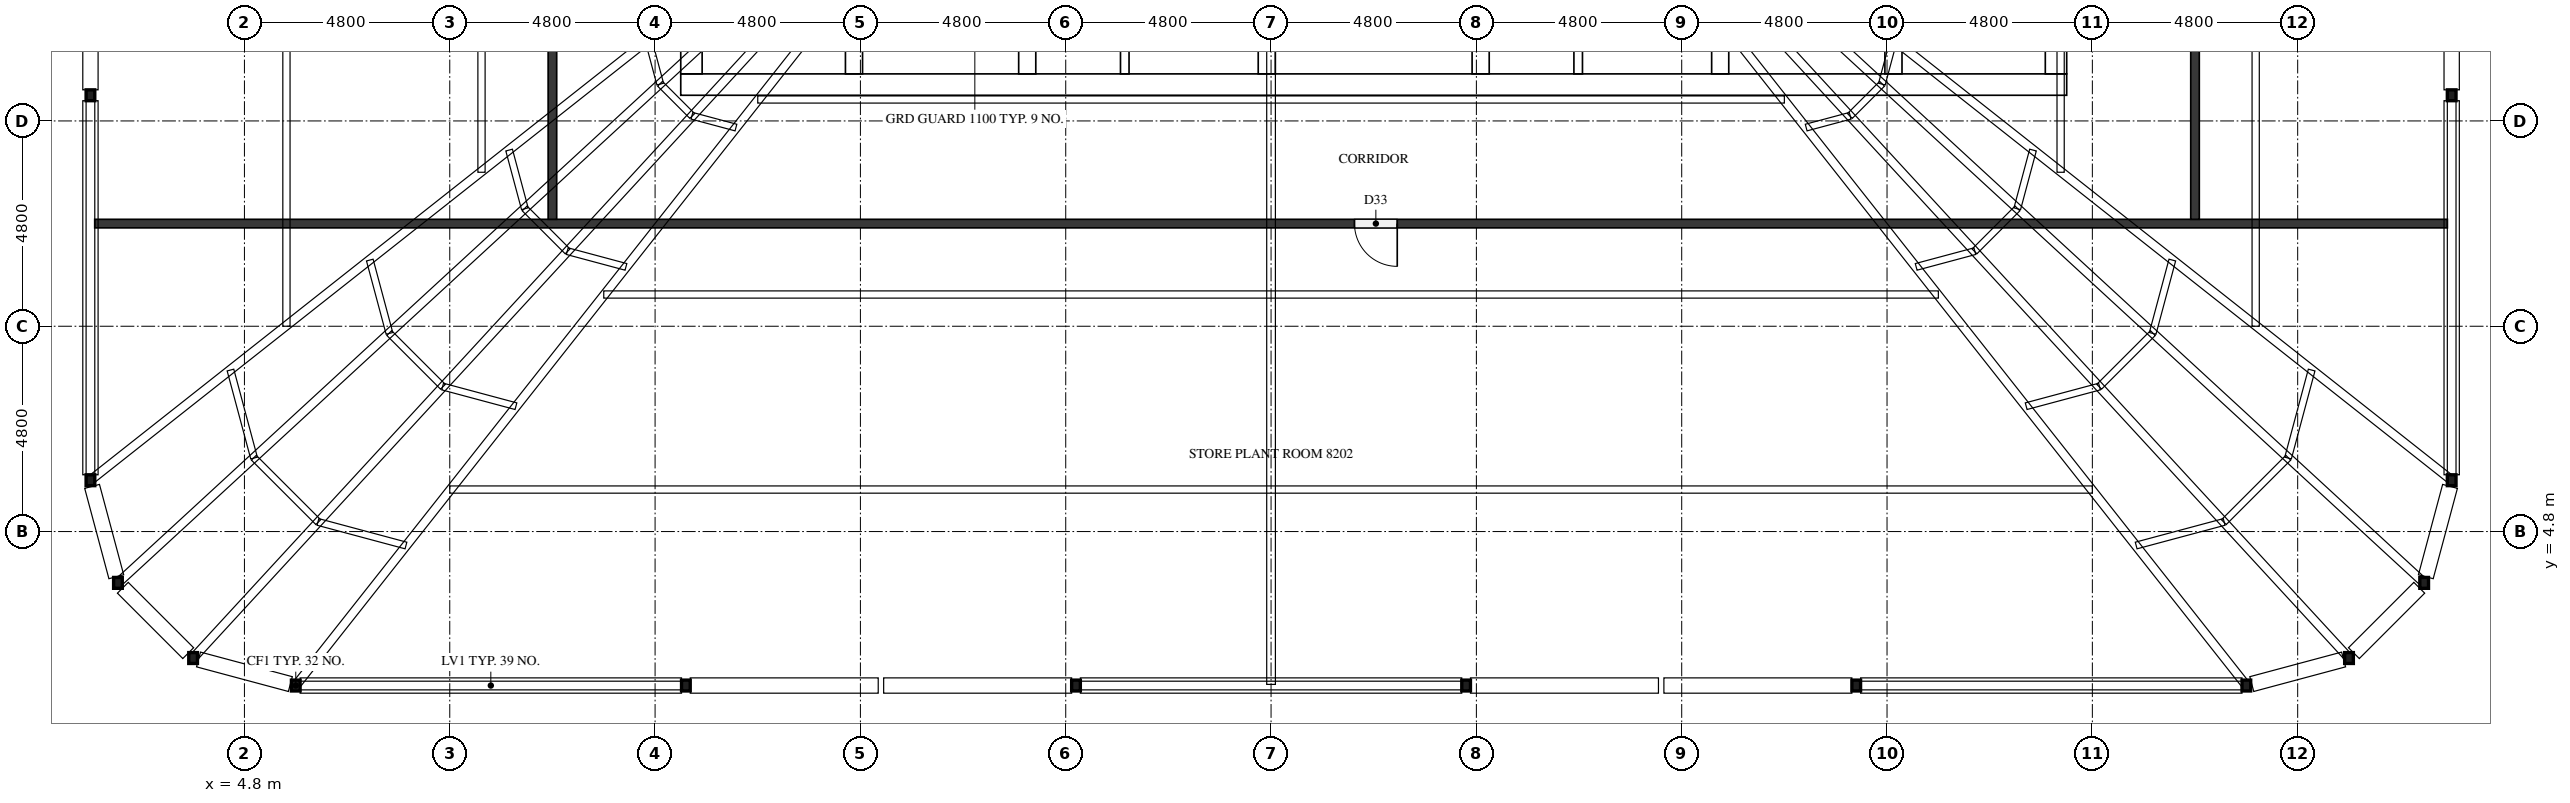
"""IFC4 building model, lengths in metres.
Left out: names, types, materials, properties, quantities, classifications, styles, units other than length and angle.
Written with IfcOpenShell. Run it as: python <this file> out.ifc"""

import sys

from ifc_helpers import new_model, si_unit, direction, frame, frame_2d, origin, origin_2d, place, context, subcontext, project, spatial, rectangle, hollow_rectangle, extrude, element, fill, save


model = new_model("IFC4")
c1 = context("Model", 3, precision=1e-05, world=origin(), true_north=direction((0.0, 1.0)))
c2 = subcontext(c1, "Body", "Model", "MODEL_VIEW")
j1 = project(units=[si_unit("LENGTHUNIT", "METRE"), si_unit("PLANEANGLEUNIT", "RADIAN")], contexts=[c1])
p1 = place(None, origin())
s1 = spatial("IfcSite", under=j1, at=p1, CompositionType="ELEMENT")
p2 = place(p1, origin())
s2 = spatial("IfcBuilding", under=s1, at=p2, CompositionType="ELEMENT")
p3 = place(p2, frame((0.0, 0.0, 317.3)))
s3 = spatial("IfcBuildingStorey", under=s2, at=p3, CompositionType="ELEMENT", Elevation=317.3)
p4 = place(p3, frame((15.0, 15.25, 0.0), z_axis=(0.0, 0.0, 1.0), x_axis=(1.0, 0.0, 0.0)))
e1 = element("IfcWall", 1, at=p4, inside=s3, PredefinedType="SHEAR", context=c2, shape_type="SweptSolid", body=[
    extrude(rectangle(XDim=32.4, YDim=0.5, at=frame_2d((16.2, 0.0))), origin(), (0.0, 0.0, 1.0), 3.0),
])
p5 = place(p4, frame((15.3, 0.0, 0.0)))
e2 = element("IfcOpeningElement", 2, at=p5, cuts=e1, PredefinedType="OPENING", context=c2, shape_type="SweptSolid", body=[
    extrude(rectangle(XDim=1.8, YDim=2.1, at=frame_2d((0.9, 1.05))), frame((0.0, 0.26, 0.0), z_axis=(0.0, -1.0, 0.0), x_axis=(1.0, 0.0, 0.0)), (0.0, 0.0, 1.0), 0.52),
])
p6 = place(p3, frame((15.25, 15.5, 0.0), z_axis=(0.0, 0.0, 1.0), x_axis=(0.0, 1.0, 0.0)))
e3 = element("IfcWall", 3, at=p6, inside=s3, PredefinedType="SHEAR", context=c2, shape_type="SweptSolid", body=[
    extrude(rectangle(XDim=21.8, YDim=0.5, at=frame_2d((10.9, 0.0))), origin(), (0.0, 0.0, 1.0), 3.0),
])
p7 = place(p6, frame((5.26, 0.0, 0.0)))
e4 = element("IfcOpeningElement", 4, at=p7, cuts=e3, PredefinedType="OPENING", context=c2, shape_type="SweptSolid", body=[
    extrude(rectangle(XDim=1.2, YDim=2.1, at=frame_2d((0.6, 1.05))), frame((0.0, 0.26, 0.0), z_axis=(0.0, -1.0, 0.0), x_axis=(1.0, 0.0, 0.0)), (0.0, 0.0, 1.0), 0.52),
])
p8 = place(p3, frame((47.15, 15.5, 0.0), z_axis=(0.0, 0.0, 1.0), x_axis=(0.0, 1.0, 0.0)))
e5 = element("IfcWall", 5, at=p8, inside=s3, PredefinedType="SHEAR", context=c2, shape_type="SweptSolid", body=[
    extrude(rectangle(XDim=21.8, YDim=0.5, at=frame_2d((10.9, 0.0))), origin(), (0.0, 0.0, 1.0), 3.0),
])
p9 = place(p8, frame((10.6, 0.0, 0.0)))
e6 = element("IfcOpeningElement", 6, at=p9, cuts=e5, PredefinedType="OPENING", context=c2, shape_type="SweptSolid", body=[
    extrude(rectangle(XDim=1.2, YDim=2.1, at=frame_2d((0.6, 1.05))), frame((0.0, 0.26, 0.0), z_axis=(0.0, -1.0, 0.0), x_axis=(1.0, 0.0, 0.0)), (0.0, 0.0, 1.0), 0.52),
])
p10 = place(p3, frame((19.05, 15.5, 0.0), z_axis=(0.0, 0.0, 1.0), x_axis=(0.0, 1.0, 0.0)))
e7 = element("IfcWall", 7, at=p10, inside=s3, PredefinedType="SHEAR", context=c2, shape_type="SweptSolid", body=[
    extrude(rectangle(XDim=15.55, YDim=0.4, at=frame_2d((7.775, 0.0))), origin(), (0.0, 0.0, 1.0), 3.0),
])
p11 = place(p10, frame((9.95, 0.0, 0.0)))
e8 = element("IfcOpeningElement", 8, at=p11, cuts=e7, PredefinedType="OPENING", context=c2, shape_type="SweptSolid", body=[
    extrude(rectangle(XDim=1.1, YDim=2.1, at=frame_2d((0.55, 1.05))), frame((0.0, 0.21, 0.0), z_axis=(0.0, -1.0, 0.0), x_axis=(1.0, 0.0, 0.0)), (0.0, 0.0, 1.0), 0.42),
])
p12 = place(p10, frame((13.45, 0.0, 0.0)))
e9 = element("IfcOpeningElement", 9, at=p12, cuts=e7, PredefinedType="OPENING", context=c2, shape_type="SweptSolid", body=[
    extrude(rectangle(XDim=1.1, YDim=2.1, at=frame_2d((0.55, 1.05))), frame((0.0, 0.21, 0.0), z_axis=(0.0, -1.0, 0.0), x_axis=(1.0, 0.0, 0.0)), (0.0, 0.0, 1.0), 0.42),
])
p13 = place(p10, frame((0.7, 0.0, 0.0)))
e10 = element("IfcOpeningElement", 10, at=p13, cuts=e7, PredefinedType="OPENING", context=c2, shape_type="SweptSolid", body=[
    extrude(rectangle(XDim=1.2, YDim=2.1, at=frame_2d((0.6, 1.05))), frame((0.0, 0.21, 0.0), z_axis=(0.0, -1.0, 0.0), x_axis=(1.0, 0.0, 0.0)), (0.0, 0.0, 1.0), 0.42),
])
p14 = place(p3, frame((23.1, 15.5, 0.0), z_axis=(0.0, 0.0, 1.0), x_axis=(0.0, 1.0, 0.0)))
e11 = element("IfcWall", 11, at=p14, inside=s3, PredefinedType="SHEAR", context=c2, shape_type="SweptSolid", body=[
    extrude(rectangle(XDim=21.8, YDim=0.4, at=frame_2d((10.9, 0.0))), origin(), (0.0, 0.0, 1.0), 3.0),
])
p15 = place(p3, frame((39.3, 15.5, 0.0), z_axis=(0.0, 0.0, 1.0), x_axis=(0.0, 1.0, 0.0)))
e12 = element("IfcWall", 12, at=p15, inside=s3, PredefinedType="SHEAR", context=c2, shape_type="SweptSolid", body=[
    extrude(rectangle(XDim=8.75, YDim=0.4, at=frame_2d((4.375, 0.0))), origin(), (0.0, 0.0, 1.0), 3.0),
])
p16 = place(p3, frame((43.35, 15.5, 0.0), z_axis=(0.0, 0.0, 1.0), x_axis=(0.0, 1.0, 0.0)))
e13 = element("IfcWall", 13, at=p16, inside=s3, PredefinedType="SHEAR", context=c2, shape_type="SweptSolid", body=[
    extrude(rectangle(XDim=8.75, YDim=0.4, at=frame_2d((4.375, 0.0))), origin(), (0.0, 0.0, 1.0), 3.0),
])
p17 = place(p16, frame((0.7, 0.0, 0.0)))
e14 = element("IfcOpeningElement", 14, at=p17, cuts=e13, PredefinedType="OPENING", context=c2, shape_type="SweptSolid", body=[
    extrude(rectangle(XDim=1.2, YDim=2.1, at=frame_2d((0.6, 1.05))), frame((0.0, 0.21, 0.0), z_axis=(0.0, -1.0, 0.0), x_axis=(1.0, 0.0, 0.0)), (0.0, 0.0, 1.0), 0.42),
])
for number, where, z_axis, x_axis in (
    (15, (28.7, 15.5, 0.0), (0.0, 0.0, 1.0), (0.0, 1.0, 0.0)),
    (16, (33.7, 15.5, 0.0), (0.0, 0.0, 1.0), (0.0, 1.0, 0.0)),
):
    element("IfcWall", number, at=place(p3, frame(where, z_axis=z_axis, x_axis=x_axis)), inside=s3, PredefinedType="SHEAR", context=c2, shape_type="SweptSolid", body=[
        extrude(rectangle(XDim=3.05, YDim=0.4, at=frame_2d((1.525, 0.0))), origin(), (0.0, 0.0, 1.0), 3.0),
    ])
for number, where, z_axis, x_axis in (
    (17, (6.0, 1.2, 0.0), (0.0, 0.0, 1.0), (1.0, 0.0, 0.0)),
    (18, (15.12, 1.2, 0.0), (0.0, 0.0, 1.0), (1.0, 0.0, 0.0)),
    (19, (24.24, 1.2, 0.0), (0.0, 0.0, 1.0), (1.0, 0.0, 0.0)),
    (20, (33.36, 1.2, 0.0), (0.0, 0.0, 1.0), (1.0, 0.0, 0.0)),
    (21, (42.48, 1.2, 0.0), (0.0, 0.0, 1.0), (1.0, 0.0, 0.0)),
    (22, (51.6, 1.2, 0.0), (0.0, 0.0, 1.0), (1.0, 0.0, 0.0)),
    (23, (54.0, 1.843, 0.0), (0.0, 0.0, 1.0), (1.0, 0.0, 0.0)),
    (24, (55.757, 3.6, 0.0), (0.0, 0.0, 1.0), (1.0, 0.0, 0.0)),
    (25, (56.4, 6.0, 0.0), (0.0, 0.0, 1.0), (1.0, 0.0, 0.0)),
    (26, (56.4, 15.0, 0.0), (0.0, 0.0, 1.0), (1.0, 0.0, 0.0)),
    (27, (1.2, 15.0, 0.0), (0.0, 0.0, 1.0), (1.0, 0.0, 0.0)),
    (28, (1.2, 6.0, 0.0), (0.0, 0.0, 1.0), (1.0, 0.0, 0.0)),
    (29, (1.843, 3.6, 0.0), (0.0, 0.0, 1.0), (1.0, 0.0, 0.0)),
    (30, (3.6, 1.843, 0.0), (0.0, 0.0, 1.0), (1.0, 0.0, 0.0)),
):
    element("IfcColumn", number, at=place(p3, frame(where, z_axis=z_axis, x_axis=x_axis)), inside=s3, PredefinedType="COLUMN", context=c2, shape_type="SweptSolid", body=[
        extrude(hollow_rectangle(XDim=0.203, YDim=0.254, WallThickness=0.01, InnerFilletRadius=0.004, OuterFilletRadius=0.013, at=origin_2d()), origin(), (0.0, 0.0, 1.0), 3.0),
    ])
for number, where, z_axis, x_axis in (
    (31, (25.38, 15.5, 0.0), (0.0, 0.0, 1.0), (0.0, 1.0, 0.0)),
    (32, (35.98, 15.5, 0.0), (0.0, 0.0, 1.0), (0.0, 1.0, 0.0)),
):
    element("IfcWall", number, at=place(p3, frame(where, z_axis=z_axis, x_axis=x_axis)), inside=s3, PredefinedType="PARTITIONING", context=c2, shape_type="SweptSolid", body=[
        extrude(rectangle(XDim=3.05, YDim=0.2, at=frame_2d((1.525, 0.0))), origin(), (0.0, 0.0, 1.0), 3.0),
    ])
p18 = place(p3, frame((56.3, 12.0, 0.0), z_axis=(0.0, 0.0, 1.0), x_axis=(-1.0, 0.0, 0.0)))
e33 = element("IfcWall", 33, at=p18, inside=s3, PredefinedType="PARTITIONING", context=c2, shape_type="SweptSolid", body=[
    extrude(rectangle(XDim=55.0, YDim=0.2, at=frame_2d((27.5, 0.0))), origin(), (0.0, 0.0, 1.0), 3.0),
])
p19 = place(p18, frame((24.55, 0.0, 0.0)))
e34 = element("IfcOpeningElement", 34, at=p19, cuts=e33, PredefinedType="OPENING", context=c2, shape_type="SweptSolid", body=[
    extrude(rectangle(XDim=1.0, YDim=2.1, at=frame_2d((0.5, 1.05))), frame((0.0, 0.11, 0.0), z_axis=(0.0, -1.0, 0.0), x_axis=(1.0, 0.0, 0.0)), (0.0, 0.0, 1.0), 0.22),
])
p20 = place(p3, frame((12.0, 12.1, 0.0), z_axis=(0.0, 0.0, 1.0), x_axis=(0.0, 1.0, 0.0)))
e35 = element("IfcWall", 35, at=p20, inside=s3, PredefinedType="PARTITIONING", context=c2, shape_type="SweptSolid", body=[
    extrude(rectangle(XDim=28.6, YDim=0.2, at=frame_2d((14.3, 0.0))), origin(), (0.0, 0.0, 1.0), 3.0),
])
p21 = place(p20, frame((13.75, 0.0, 0.0)))
e36 = element("IfcOpeningElement", 36, at=p21, cuts=e35, PredefinedType="OPENING", context=c2, shape_type="SweptSolid", body=[
    extrude(rectangle(XDim=1.0, YDim=2.1, at=frame_2d((0.5, 1.05))), frame((0.0, 0.11, 0.0), z_axis=(0.0, -1.0, 0.0), x_axis=(1.0, 0.0, 0.0)), (0.0, 0.0, 1.0), 0.22),
])
p22 = place(p3, frame((50.4, 40.7, 0.0), z_axis=(0.0, 0.0, 1.0), x_axis=(0.0, -1.0, 0.0)))
e37 = element("IfcWall", 37, at=p22, inside=s3, PredefinedType="PARTITIONING", context=c2, shape_type="SweptSolid", body=[
    extrude(rectangle(XDim=28.6, YDim=0.2, at=frame_2d((14.3, 0.0))), origin(), (0.0, 0.0, 1.0), 3.0),
])
p23 = place(p22, frame((13.75, 0.0, 0.0)))
e38 = element("IfcOpeningElement", 38, at=p23, cuts=e37, PredefinedType="OPENING", context=c2, shape_type="SweptSolid", body=[
    extrude(rectangle(XDim=1.0, YDim=2.1, at=frame_2d((0.5, 1.05))), frame((0.0, 0.11, 0.0), z_axis=(0.0, -1.0, 0.0), x_axis=(1.0, 0.0, 0.0)), (0.0, 0.0, 1.0), 0.22),
])
p24 = place(p5, frame((1.8, 0.0, 0.0), z_axis=(0.0, 0.0, 1.0), x_axis=(-1.0, 0.0, 0.0)))
e39 = element("IfcDoor", 39, at=p24, inside=s3, OperationType="DOUBLE_DOOR_SINGLE_SWING", PredefinedType="DOOR", context=c2, shape_type="SweptSolid", body=[
    extrude(rectangle(XDim=1.8, YDim=2.1, at=frame_2d((0.9, 1.05))), frame((0.0, 0.025, 0.0), z_axis=(0.0, -1.0, 0.0), x_axis=(1.0, 0.0, 0.0)), (0.0, 0.0, 1.0), 0.05),
])
fill(e2, e39)
p25 = place(p19, origin())
e40 = element("IfcDoor", 40, at=p25, inside=s3, OperationType="SINGLE_SWING_LEFT", PredefinedType="DOOR", context=c2, shape_type="SweptSolid", body=[
    extrude(rectangle(XDim=1.0, YDim=2.1, at=frame_2d((0.5, 1.05))), frame((0.0, 0.025, 0.0), z_axis=(0.0, -1.0, 0.0), x_axis=(1.0, 0.0, 0.0)), (0.0, 0.0, 1.0), 0.05),
])
fill(e34, e40)
save(model, sys.argv[1])
